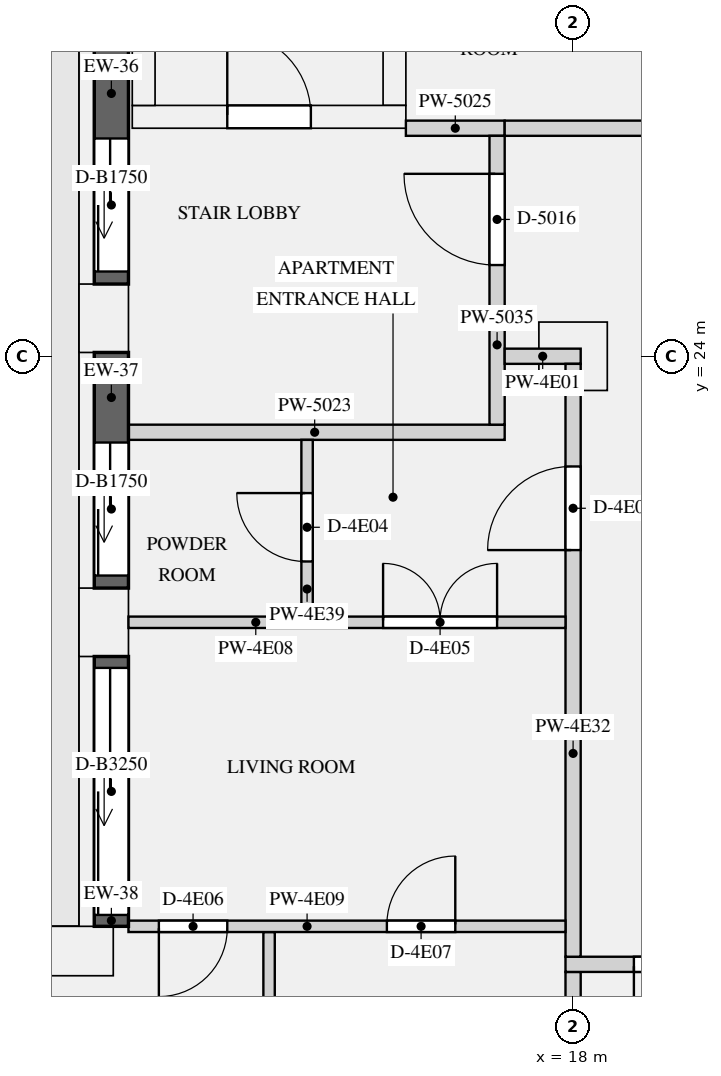
"""IFC4 building model, lengths in metres.
Left out: names, types, materials, properties, quantities, classifications, styles, units other than length and angle.
Written with IfcOpenShell. Run it as: python <this file> out.ifc"""

import sys

from ifc_helpers import new_model, si_unit, direction, frame, frame_2d, origin, origin_2d, place, context, subcontext, project, spatial, rectangle, extrude, element, fill, save


model = new_model("IFC4")
c1 = context("Model", 3, precision=1e-05, world=origin(), true_north=direction((0.0, 1.0)))
c2 = subcontext(c1, "Body", "Model", "MODEL_VIEW")
j1 = project(units=[si_unit("LENGTHUNIT", "METRE"), si_unit("PLANEANGLEUNIT", "RADIAN")], contexts=[c1])
p1 = place(None, origin())
s1 = spatial("IfcSite", under=j1, at=p1, CompositionType="ELEMENT")
p2 = place(p1, origin())
s2 = spatial("IfcBuilding", under=s1, at=p2, CompositionType="ELEMENT")
p3 = place(p2, frame((0.0, 0.0, 229.5)))
s3 = spatial("IfcBuildingStorey", under=s2, at=p3, CompositionType="ELEMENT", Elevation=229.5)
for number, where, z_axis, x_axis in (
    (1, (11.825, 24.5, 0.0), (0.0, 0.0, 1.0), (0.0, -1.0, 0.0)),
    (2, (11.825, 20.5, 0.0), (0.0, 0.0, 1.0), (0.0, -1.0, 0.0)),
    (3, (11.5, 16.175, 0.0), (0.0, 0.0, 1.0), (-1.0, 0.0, 0.0)),
):
    element("IfcColumn", number, at=place(p3, frame(where, z_axis=z_axis, x_axis=x_axis)), inside=s3, PredefinedType="USERDEFINED", context=c2, shape_type="SweptSolid", body=[
        extrude(rectangle(XDim=0.9, YDim=0.65, at=origin_2d()), origin(), (0.0, 0.0, 1.0), 3.15),
    ])
p4 = place(p3, frame((18.0, 24.0, 0.0), z_axis=(0.0, 0.0, 1.0), x_axis=(1.0, 0.0, 0.0)))
e4 = element("IfcColumn", 4, at=p4, inside=s3, PredefinedType="COLUMN", context=c2, shape_type="SweptSolid", body=[
    extrude(rectangle(XDim=0.9, YDim=0.9, at=origin_2d()), origin(), (0.0, 0.0, 1.0), 3.15),
])
p5 = place(p3, frame((12.2, 27.15, 0.0), z_axis=(0.0, 0.0, 1.0), x_axis=(1.0, 0.0, 0.0)))
e5 = element("IfcWall", 5, at=p5, inside=s3, PredefinedType="SHEAR", context=c2, shape_type="SweptSolid", body=[
    extrude(rectangle(XDim=3.6, YDim=0.3, at=frame_2d((1.8, 0.0))), origin(), (0.0, 0.0, 1.0), 3.15),
])
p6 = place(p5, frame((1.25, 0.0, 0.0)))
e6 = element("IfcOpeningElement", 6, at=p6, cuts=e5, PredefinedType="OPENING", context=c2, shape_type="SweptSolid", body=[
    extrude(rectangle(XDim=1.1, YDim=2.1, at=frame_2d((0.55, 1.05))), frame((0.0, 0.16, 0.0), z_axis=(0.0, -1.0, 0.0), x_axis=(1.0, 0.0, 0.0)), (0.0, 0.0, 1.0), 0.32),
])
for number, where, z_axis, x_axis in (
    (7, (12.35, 27.3, 0.0), (0.0, 0.0, 1.0), (0.0, 1.0, 0.0)),
    (8, (15.65, 27.3, 0.0), (0.0, 0.0, 1.0), (0.0, 1.0, 0.0)),
):
    element("IfcWall", number, at=place(p3, frame(where, z_axis=z_axis, x_axis=x_axis)), inside=s3, PredefinedType="SHEAR", context=c2, shape_type="SweptSolid", body=[
        extrude(rectangle(XDim=7.8, YDim=0.3, at=frame_2d((3.9, 0.0))), origin(), (0.0, 0.0, 1.0), 3.15),
    ])
p7 = place(p3, frame((11.925, 28.05, 0.0), z_axis=(0.0, 0.0, 1.0), x_axis=(0.0, -1.0, 0.0)))
e9 = element("IfcWall", 9, at=p7, inside=s3, PredefinedType="SOLIDWALL", context=c2, shape_type="SweptSolid", body=[
    extrude(rectangle(XDim=3.1, YDim=0.45, at=frame_2d((1.55, 0.0))), origin(), (0.0, 0.0, 1.0), 2.83),
])
p8 = place(p7, frame((1.185, 0.0, 0.0)))
e10 = element("IfcOpeningElement", 10, at=p8, cuts=e9, PredefinedType="OPENING", context=c2, shape_type="SweptSolid", body=[
    extrude(rectangle(XDim=1.75, YDim=2.3, at=frame_2d((0.875, 1.15))), frame((0.0, 0.235, 0.0), z_axis=(0.0, -1.0, 0.0), x_axis=(1.0, 0.0, 0.0)), (0.0, 0.0, 1.0), 0.47),
])
p9 = place(p3, frame((11.925, 24.05, 0.0), z_axis=(0.0, 0.0, 1.0), x_axis=(0.0, -1.0, 0.0)))
e11 = element("IfcWall", 11, at=p9, inside=s3, PredefinedType="SOLIDWALL", context=c2, shape_type="SweptSolid", body=[
    extrude(rectangle(XDim=3.1, YDim=0.45, at=frame_2d((1.55, 0.0))), origin(), (0.0, 0.0, 1.0), 2.83),
])
p10 = place(p9, frame((1.185, 0.0, 0.0)))
e12 = element("IfcOpeningElement", 12, at=p10, cuts=e11, PredefinedType="OPENING", context=c2, shape_type="SweptSolid", body=[
    extrude(rectangle(XDim=1.75, YDim=2.3, at=frame_2d((0.875, 1.15))), frame((0.0, 0.235, 0.0), z_axis=(0.0, -1.0, 0.0), x_axis=(1.0, 0.0, 0.0)), (0.0, 0.0, 1.0), 0.47),
])
p11 = place(p3, frame((11.925, 20.05, 0.0), z_axis=(0.0, 0.0, 1.0), x_axis=(0.0, -1.0, 0.0)))
e13 = element("IfcWall", 13, at=p11, inside=s3, PredefinedType="SOLIDWALL", context=c2, shape_type="SweptSolid", body=[
    extrude(rectangle(XDim=3.55, YDim=0.45, at=frame_2d((1.775, 0.0))), origin(), (0.0, 0.0, 1.0), 2.83),
])
p12 = place(p11, frame((0.15, 0.0, 0.0)))
e14 = element("IfcOpeningElement", 14, at=p12, cuts=e13, PredefinedType="OPENING", context=c2, shape_type="SweptSolid", body=[
    extrude(rectangle(XDim=3.25, YDim=2.3, at=frame_2d((1.625, 1.15))), frame((0.0, 0.235, 0.0), z_axis=(0.0, -1.0, 0.0), x_axis=(1.0, 0.0, 0.0)), (0.0, 0.0, 1.0), 0.47),
])
p13 = place(p3, frame((12.1, 23.0, 0.0), z_axis=(0.0, 0.0, 1.0), x_axis=(1.0, 0.0, 0.0)))
e15 = element("IfcWall", 15, at=p13, inside=s3, PredefinedType="PARTITIONING", context=c2, shape_type="SweptSolid", body=[
    extrude(rectangle(XDim=5.0, YDim=0.2, at=frame_2d((2.5, 0.0))), origin(), (0.0, 0.0, 1.0), 2.83),
])
p14 = place(p3, frame((15.8, 27.0, 0.0), z_axis=(0.0, 0.0, 1.0), x_axis=(1.0, 0.0, 0.0)))
e16 = element("IfcWall", 16, at=p14, inside=s3, PredefinedType="PARTITIONING", context=c2, shape_type="SweptSolid", body=[
    extrude(rectangle(XDim=1.3, YDim=0.2, at=frame_2d((0.65, 0.0))), origin(), (0.0, 0.0, 1.0), 2.83),
])
p15 = place(p3, frame((18.0, 12.5, 0.0), z_axis=(0.0, 0.0, 1.0), x_axis=(0.0, 1.0, 0.0)))
e17 = element("IfcWall", 17, at=p15, inside=s3, PredefinedType="PARTITIONING", context=c2, shape_type="SweptSolid", body=[
    extrude(rectangle(XDim=3.4, YDim=0.2, at=frame_2d((1.7, 0.0))), origin(), (0.0, 0.0, 1.0), 2.83),
])
p16 = place(p3, frame((17.0, 23.1, 0.0), z_axis=(0.0, 0.0, 1.0), x_axis=(0.0, 1.0, 0.0)))
e18 = element("IfcWall", 18, at=p16, inside=s3, PredefinedType="PARTITIONING", context=c2, shape_type="SweptSolid", body=[
    extrude(rectangle(XDim=3.8, YDim=0.2, at=frame_2d((1.9, 0.0))), origin(), (0.0, 0.0, 1.0), 2.83),
])
p17 = place(p16, frame((2.1, 0.0, 0.0)))
e19 = element("IfcOpeningElement", 19, at=p17, cuts=e18, PredefinedType="OPENING", context=c2, shape_type="SweptSolid", body=[
    extrude(rectangle(XDim=1.2, YDim=2.1, at=frame_2d((0.6, 1.05))), frame((0.0, 0.11, 0.0), z_axis=(0.0, -1.0, 0.0), x_axis=(1.0, 0.0, 0.0)), (0.0, 0.0, 1.0), 0.22),
])
p18 = place(p3, frame((17.1, 24.0, 0.0), z_axis=(0.0, 0.0, 1.0), x_axis=(1.0, 0.0, 0.0)))
e20 = element("IfcWall", 20, at=p18, inside=s3, PredefinedType="PARTITIONING", context=c2, shape_type="SweptSolid", body=[
    extrude(rectangle(XDim=1.0, YDim=0.2, at=frame_2d((0.5, 0.0))), origin(), (0.0, 0.0, 1.0), 2.83),
])
p19 = place(p3, frame((17.1, 27.0, 0.0), z_axis=(0.0, 0.0, 1.0), x_axis=(1.0, 0.0, 0.0)))
e21 = element("IfcWall", 21, at=p19, inside=s3, PredefinedType="PARTITIONING", context=c2, shape_type="SweptSolid", body=[
    extrude(rectangle(XDim=6.975, YDim=0.2, at=frame_2d((3.487, 0.0))), origin(), (0.0, 0.0, 1.0), 2.83),
])
p20 = place(p3, frame((12.15, 20.5, 0.0), z_axis=(0.0, 0.0, 1.0), x_axis=(1.0, 0.0, 0.0)))
e22 = element("IfcWall", 22, at=p20, inside=s3, PredefinedType="PARTITIONING", context=c2, shape_type="SweptSolid", body=[
    extrude(rectangle(XDim=5.75, YDim=0.15, at=frame_2d((2.875, 0.0))), origin(), (0.0, 0.0, 1.0), 2.83),
])
p21 = place(p20, frame((3.35, 0.0, 0.0)))
e23 = element("IfcOpeningElement", 23, at=p21, cuts=e22, PredefinedType="OPENING", context=c2, shape_type="SweptSolid", body=[
    extrude(rectangle(XDim=1.5, YDim=2.1, at=frame_2d((0.75, 1.05))), frame((0.0, 0.085, 0.0), z_axis=(0.0, -1.0, 0.0), x_axis=(1.0, 0.0, 0.0)), (0.0, 0.0, 1.0), 0.17),
])
p22 = place(p3, frame((12.15, 16.5, 0.0), z_axis=(0.0, 0.0, 1.0), x_axis=(1.0, 0.0, 0.0)))
e24 = element("IfcWall", 24, at=p22, inside=s3, PredefinedType="PARTITIONING", context=c2, shape_type="SweptSolid", body=[
    extrude(rectangle(XDim=5.75, YDim=0.15, at=frame_2d((2.875, 0.0))), origin(), (0.0, 0.0, 1.0), 2.83),
])
p23 = place(p22, frame((0.4, 0.0, 0.0)))
e25 = element("IfcOpeningElement", 25, at=p23, cuts=e24, PredefinedType="OPENING", context=c2, shape_type="SweptSolid", body=[
    extrude(rectangle(XDim=0.9, YDim=2.1, at=frame_2d((0.45, 1.05))), frame((0.0, 0.085, 0.0), z_axis=(0.0, -1.0, 0.0), x_axis=(1.0, 0.0, 0.0)), (0.0, 0.0, 1.0), 0.17),
])
p24 = place(p22, frame((3.4, 0.0, 0.0)))
e26 = element("IfcOpeningElement", 26, at=p24, cuts=e24, PredefinedType="OPENING", context=c2, shape_type="SweptSolid", body=[
    extrude(rectangle(XDim=0.9, YDim=2.1, at=frame_2d((0.45, 1.05))), frame((0.0, 0.085, 0.0), z_axis=(0.0, -1.0, 0.0), x_axis=(1.0, 0.0, 0.0)), (0.0, 0.0, 1.0), 0.17),
])
p25 = place(p3, frame((17.9, 16.0, 0.0), z_axis=(0.0, 0.0, 1.0), x_axis=(1.0, 0.0, 0.0)))
e27 = element("IfcWall", 27, at=p25, inside=s3, PredefinedType="PARTITIONING", context=c2, shape_type="SweptSolid", body=[
    extrude(rectangle(XDim=36.2, YDim=0.2, at=frame_2d((18.1, 0.0))), origin(), (0.0, 0.0, 1.0), 2.83),
])
p26 = place(p25, frame((0.9, 0.0, 0.0)))
e28 = element("IfcOpeningElement", 28, at=p26, cuts=e27, PredefinedType="OPENING", context=c2, shape_type="SweptSolid", body=[
    extrude(rectangle(XDim=1.4, YDim=2.1, at=frame_2d((0.7, 1.05))), frame((0.0, 0.11, 0.0), z_axis=(0.0, -1.0, 0.0), x_axis=(1.0, 0.0, 0.0)), (0.0, 0.0, 1.0), 0.22),
])
p27 = place(p25, frame((33.9, 0.0, 0.0)))
e29 = element("IfcOpeningElement", 29, at=p27, cuts=e27, PredefinedType="OPENING", context=c2, shape_type="SweptSolid", body=[
    extrude(rectangle(XDim=1.4, YDim=2.1, at=frame_2d((0.7, 1.05))), frame((0.0, 0.11, 0.0), z_axis=(0.0, -1.0, 0.0), x_axis=(1.0, 0.0, 0.0)), (0.0, 0.0, 1.0), 0.22),
])
p28 = place(p3, frame((18.0, 16.1, 0.0), z_axis=(0.0, 0.0, 1.0), x_axis=(0.0, 1.0, 0.0)))
e30 = element("IfcWall", 30, at=p28, inside=s3, PredefinedType="PARTITIONING", context=c2, shape_type="SweptSolid", body=[
    extrude(rectangle(XDim=7.8, YDim=0.2, at=frame_2d((3.9, 0.0))), origin(), (0.0, 0.0, 1.0), 2.83),
])
p29 = place(p28, frame((5.35, 0.0, 0.0)))
e31 = element("IfcOpeningElement", 31, at=p29, cuts=e30, PredefinedType="OPENING", context=c2, shape_type="SweptSolid", body=[
    extrude(rectangle(XDim=1.1, YDim=2.1, at=frame_2d((0.55, 1.05))), frame((0.0, 0.11, 0.0), z_axis=(0.0, -1.0, 0.0), x_axis=(1.0, 0.0, 0.0)), (0.0, 0.0, 1.0), 0.22),
])
p30 = place(p3, frame((14.5, 20.575, 0.0), z_axis=(0.0, 0.0, 1.0), x_axis=(0.0, 1.0, 0.0)))
e32 = element("IfcWall", 32, at=p30, inside=s3, PredefinedType="PARTITIONING", context=c2, shape_type="SweptSolid", body=[
    extrude(rectangle(XDim=2.325, YDim=0.15, at=frame_2d((1.163, 0.0))), origin(), (0.0, 0.0, 1.0), 2.83),
])
p31 = place(p30, frame((0.725, 0.0, 0.0)))
e33 = element("IfcOpeningElement", 33, at=p31, cuts=e32, PredefinedType="OPENING", context=c2, shape_type="SweptSolid", body=[
    extrude(rectangle(XDim=0.9, YDim=2.1, at=frame_2d((0.45, 1.05))), frame((0.0, 0.085, 0.0), z_axis=(0.0, -1.0, 0.0), x_axis=(1.0, 0.0, 0.0)), (0.0, 0.0, 1.0), 0.17),
])
p32 = place(p3, frame((14.0, 8.575, 0.0), z_axis=(0.0, 0.0, 1.0), x_axis=(0.0, 1.0, 0.0)))
e34 = element("IfcWall", 34, at=p32, inside=s3, PredefinedType="PARTITIONING", context=c2, shape_type="SweptSolid", body=[
    extrude(rectangle(XDim=7.85, YDim=0.15, at=frame_2d((3.925, 0.0))), origin(), (0.0, 0.0, 1.0), 2.83),
])
p33 = place(p32, frame((1.475, 0.0, 0.0)))
e35 = element("IfcOpeningElement", 35, at=p33, cuts=e34, PredefinedType="OPENING", context=c2, shape_type="SweptSolid", body=[
    extrude(rectangle(XDim=0.9, YDim=2.1, at=frame_2d((0.45, 1.05))), frame((0.0, 0.085, 0.0), z_axis=(0.0, -1.0, 0.0), x_axis=(1.0, 0.0, 0.0)), (0.0, 0.0, 1.0), 0.17),
])
p34 = place(p8, frame((1.75, -0.19, 0.0), z_axis=(0.0, 0.0, 1.0), x_axis=(-1.0, 0.0, 0.0)))
e36 = element("IfcDoor", 36, at=p34, inside=s3, OperationType="SLIDING_TO_LEFT", PredefinedType="DOOR", context=c2, shape_type="SweptSolid", body=[
    extrude(rectangle(XDim=1.75, YDim=2.3, at=frame_2d((0.875, 1.15))), frame((0.0, -0.07, 0.0), z_axis=(0.0, -1.0, 0.0), x_axis=(1.0, 0.0, 0.0)), (0.0, 0.0, 1.0), 0.05),
])
fill(e10, e36)
p35 = place(p10, origin())
e37 = element("IfcDoor", 37, at=p35, inside=s3, OperationType="SLIDING_TO_LEFT", PredefinedType="DOOR", context=c2, shape_type="SweptSolid", body=[
    extrude(rectangle(XDim=1.75, YDim=2.3, at=frame_2d((0.875, 1.15))), frame((0.0, -0.07, 0.0), z_axis=(0.0, -1.0, 0.0), x_axis=(1.0, 0.0, 0.0)), (0.0, 0.0, 1.0), 0.05),
])
fill(e12, e37)
p36 = place(p12, origin())
e38 = element("IfcDoor", 38, at=p36, inside=s3, OperationType="SLIDING_TO_LEFT", PredefinedType="DOOR", context=c2, shape_type="SweptSolid", body=[
    extrude(rectangle(XDim=3.25, YDim=2.3, at=frame_2d((1.625, 1.15))), frame((0.0, -0.07, 0.0), z_axis=(0.0, -1.0, 0.0), x_axis=(1.0, 0.0, 0.0)), (0.0, 0.0, 1.0), 0.05),
])
fill(e14, e38)
p37 = place(p6, origin())
e39 = element("IfcDoor", 39, at=p37, inside=s3, OperationType="SINGLE_SWING_LEFT", PredefinedType="DOOR", context=c2, shape_type="SweptSolid", body=[
    extrude(rectangle(XDim=1.1, YDim=2.1, at=frame_2d((0.55, 1.05))), frame((0.0, 0.025, 0.0), z_axis=(0.0, -1.0, 0.0), x_axis=(1.0, 0.0, 0.0)), (0.0, 0.0, 1.0), 0.05),
])
fill(e6, e39)
p38 = place(p17, origin())
e40 = element("IfcDoor", 40, at=p38, inside=s3, OperationType="SINGLE_SWING_RIGHT", PredefinedType="DOOR", context=c2, shape_type="SweptSolid", body=[
    extrude(rectangle(XDim=1.2, YDim=2.1, at=frame_2d((0.6, 1.05))), frame((0.0, 0.025, 0.0), z_axis=(0.0, -1.0, 0.0), x_axis=(1.0, 0.0, 0.0)), (0.0, 0.0, 1.0), 0.05),
])
fill(e19, e40)
p39 = place(p26, frame((1.4, 0.0, 0.0), z_axis=(0.0, 0.0, 1.0), x_axis=(-1.0, 0.0, 0.0)))
e41 = element("IfcDoor", 41, at=p39, inside=s3, OperationType="DOUBLE_DOOR_SINGLE_SWING", PredefinedType="DOOR", context=c2, shape_type="SweptSolid", body=[
    extrude(rectangle(XDim=1.4, YDim=2.1, at=frame_2d((0.7, 1.05))), frame((0.0, 0.025, 0.0), z_axis=(0.0, -1.0, 0.0), x_axis=(1.0, 0.0, 0.0)), (0.0, 0.0, 1.0), 0.05),
])
fill(e28, e41)
p40 = place(p29, origin())
e42 = element("IfcDoor", 42, at=p40, inside=s3, OperationType="SINGLE_SWING_LEFT", PredefinedType="DOOR", context=c2, shape_type="SweptSolid", body=[
    extrude(rectangle(XDim=1.1, YDim=2.1, at=frame_2d((0.55, 1.05))), frame((0.0, 0.025, 0.0), z_axis=(0.0, -1.0, 0.0), x_axis=(1.0, 0.0, 0.0)), (0.0, 0.0, 1.0), 0.05),
])
fill(e31, e42)
p41 = place(p31, origin())
e43 = element("IfcDoor", 43, at=p41, inside=s3, OperationType="SINGLE_SWING_RIGHT", PredefinedType="DOOR", context=c2, shape_type="SweptSolid", body=[
    extrude(rectangle(XDim=0.9, YDim=2.1, at=frame_2d((0.45, 1.05))), frame((0.0, 0.025, 0.0), z_axis=(0.0, -1.0, 0.0), x_axis=(1.0, 0.0, 0.0)), (0.0, 0.0, 1.0), 0.05),
])
fill(e33, e43)
p42 = place(p21, origin())
e44 = element("IfcDoor", 44, at=p42, inside=s3, OperationType="DOUBLE_DOOR_SINGLE_SWING", PredefinedType="DOOR", context=c2, shape_type="SweptSolid", body=[
    extrude(rectangle(XDim=1.5, YDim=2.1, at=frame_2d((0.75, 1.05))), frame((0.0, 0.025, 0.0), z_axis=(0.0, -1.0, 0.0), x_axis=(1.0, 0.0, 0.0)), (0.0, 0.0, 1.0), 0.05),
])
fill(e23, e44)
p43 = place(p23, frame((0.9, 0.0, 0.0), z_axis=(0.0, 0.0, 1.0), x_axis=(-1.0, 0.0, 0.0)))
e45 = element("IfcDoor", 45, at=p43, inside=s3, OperationType="SINGLE_SWING_RIGHT", PredefinedType="DOOR", context=c2, shape_type="SweptSolid", body=[
    extrude(rectangle(XDim=0.9, YDim=2.1, at=frame_2d((0.45, 1.05))), frame((0.0, 0.025, 0.0), z_axis=(0.0, -1.0, 0.0), x_axis=(1.0, 0.0, 0.0)), (0.0, 0.0, 1.0), 0.05),
])
fill(e25, e45)
p44 = place(p24, origin())
e46 = element("IfcDoor", 46, at=p44, inside=s3, OperationType="SINGLE_SWING_RIGHT", PredefinedType="DOOR", context=c2, shape_type="SweptSolid", body=[
    extrude(rectangle(XDim=0.9, YDim=2.1, at=frame_2d((0.45, 1.05))), frame((0.0, 0.025, 0.0), z_axis=(0.0, -1.0, 0.0), x_axis=(1.0, 0.0, 0.0)), (0.0, 0.0, 1.0), 0.05),
])
fill(e26, e46)
save(model, sys.argv[1])
